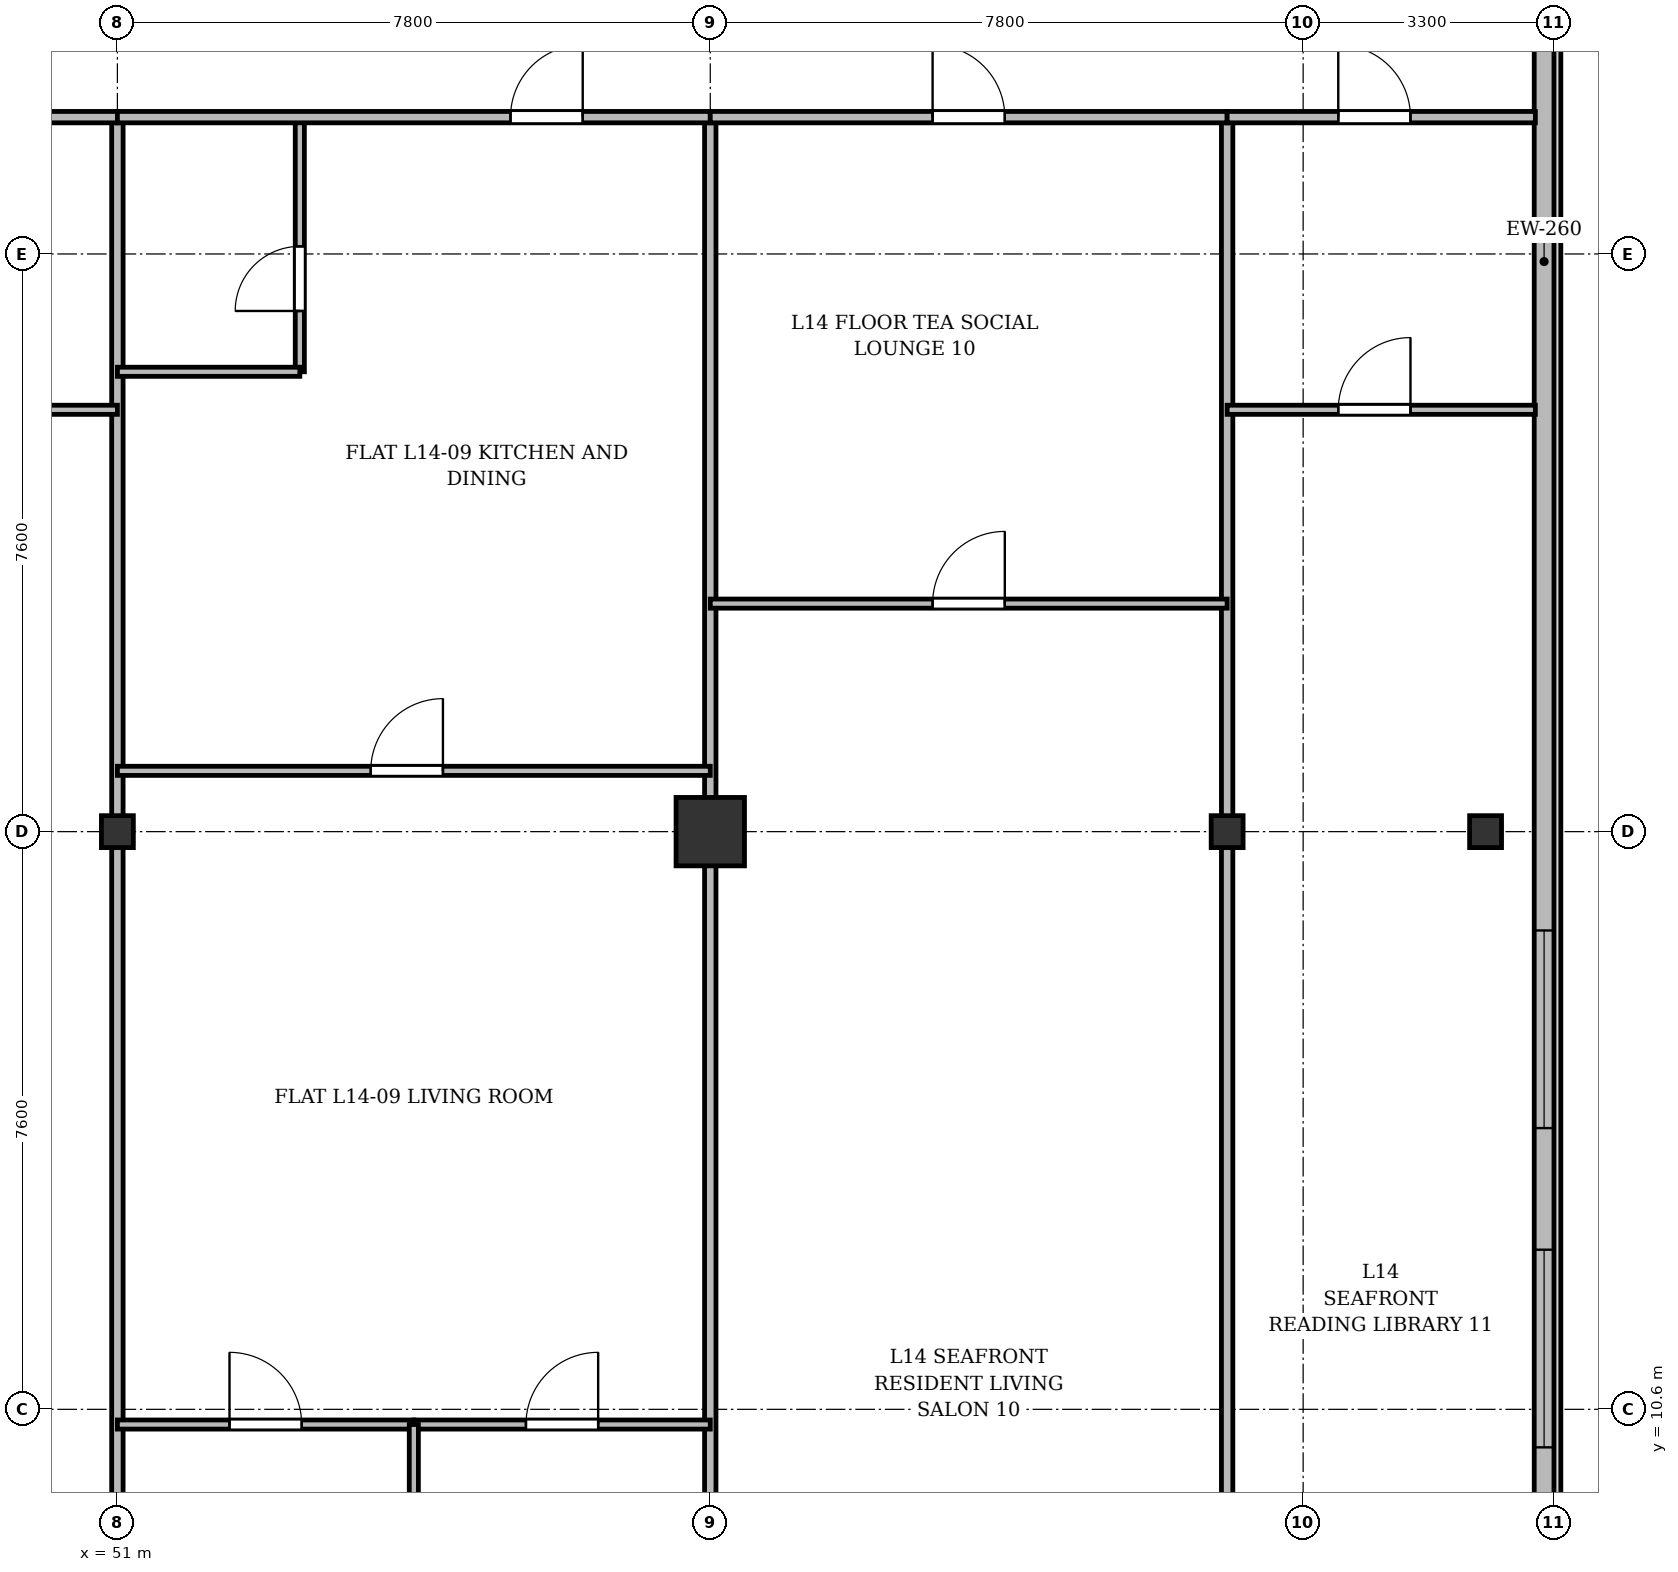
"""IFC4 building model, lengths in metres.
Left out: names, types, materials, properties, quantities, classifications, styles, units other than length and angle.
Written with IfcOpenShell. Run it as: python <this file> out.ifc"""

import sys

from ifc_helpers import new_model, si_unit, direction, frame, frame_2d, origin, origin_2d, place, context, subcontext, project, spatial, rectangle, i_section, extrude, source, transform, mapped, element, fill, save


model = new_model("IFC4")
c1 = context("Model", 3, precision=1e-05, world=origin(), true_north=direction((0.0, 1.0)))
c2 = subcontext(c1, "Body", "Model", "MODEL_VIEW")
j1 = project(units=[si_unit("LENGTHUNIT", "METRE"), si_unit("PLANEANGLEUNIT", "RADIAN")], contexts=[c1])
p1 = place(None, origin())
s1 = spatial("IfcSite", under=j1, at=p1, CompositionType="ELEMENT")
p2 = place(p1, origin())
s2 = spatial("IfcBuilding", under=s1, at=p2, CompositionType="ELEMENT")
p3 = place(p2, frame((0.0, 0.0, 55.9)))
s3 = spatial("IfcBuildingStorey", under=s2, at=p3, CompositionType="ELEMENT", Elevation=55.9)
m1 = source(origin(), c2, "Body", "SweptSolid", [
    extrude(i_section(OverallWidth=0.42, OverallDepth=0.42, WebThickness=0.026, FlangeThickness=0.04, at=origin_2d()), origin(), (0.0, 0.0, 1.0), 3.6),
])
p4 = place(p3, frame((51.0, 18.2, 0.0), z_axis=(0.0, 0.0, 1.0), x_axis=(1.0, 0.0, 0.0)))
e1 = element("IfcColumn", 1, at=p4, inside=s3, PredefinedType="COLUMN", context=c2, shape_type="MappedRepresentation", body=[
    mapped(m1, transform((0.0, 0.0, 0.0), x_axis=(1.0, 0.0, 0.0), y_axis=(0.0, 1.0, 0.0), z_axis=(0.0, 0.0, 1.0), scale=1.0)),
])
m2 = source(origin(), c2, "Body", "SweptSolid", [
    extrude(rectangle(XDim=0.9, YDim=0.9, at=origin_2d()), origin(), (0.0, 0.0, 1.0), 3.6),
])
p5 = place(p3, frame((58.8, 18.2, 0.0), z_axis=(0.0, 0.0, 1.0), x_axis=(1.0, 0.0, 0.0)))
e2 = element("IfcColumn", 2, at=p5, inside=s3, PredefinedType="COLUMN", context=c2, shape_type="MappedRepresentation", body=[
    mapped(m2, transform((0.0, 0.0, 0.0), x_axis=(1.0, 0.0, 0.0), y_axis=(0.0, 1.0, 0.0), z_axis=(0.0, 0.0, 1.0), scale=1.0)),
])
for number, where, z_axis, x_axis in (
    (3, (65.6, 18.2, 0.0), (0.0, 0.0, 1.0), (1.0, 0.0, 0.0)),
    (4, (69.0, 18.2, 0.0), (0.0, 0.0, 1.0), (1.0, 0.0, 0.0)),
):
    element("IfcColumn", number, at=place(p3, frame(where, z_axis=z_axis, x_axis=x_axis)), inside=s3, PredefinedType="COLUMN", context=c2, shape_type="MappedRepresentation", body=[
        mapped(m1, transform((0.0, 0.0, 0.0), x_axis=(1.0, 0.0, 0.0), y_axis=(0.0, 1.0, 0.0), z_axis=(0.0, 0.0, 1.0), scale=1.0)),
    ])
p6 = place(p3, frame((69.77, 45.5, 0.0), z_axis=(0.0, 0.0, 1.0), x_axis=(0.0, -1.0, 0.0)))
e5 = element("IfcWall", 5, at=p6, inside=s3, PredefinedType="SOLIDWALL", context=c2, shape_type="SweptSolid", body=[
    extrude(rectangle(XDim=39.6, YDim=0.26, at=frame_2d((19.8, 0.0))), origin(), (0.0, 0.0, 1.0), 3.34),
])
p7 = place(p6, frame((36.95, 0.0, 0.92)))
e6 = element("IfcOpeningElement", 6, at=p7, cuts=e5, PredefinedType="OPENING", context=c2, shape_type="SweptSolid", body=[
    extrude(rectangle(XDim=1.2, YDim=1.65, at=frame_2d((0.6, 0.825))), frame((0.0, 0.14, 0.0), z_axis=(0.0, -1.0, 0.0), x_axis=(1.0, 0.0, 0.0)), (0.0, 0.0, 1.0), 0.28),
])
p8 = place(p6, frame((32.8, 0.0, 0.92)))
e7 = element("IfcOpeningElement", 7, at=p8, cuts=e5, PredefinedType="OPENING", context=c2, shape_type="SweptSolid", body=[
    extrude(rectangle(XDim=2.6, YDim=1.9, at=frame_2d((1.3, 0.95))), frame((0.0, 0.14, 0.0), z_axis=(0.0, -1.0, 0.0), x_axis=(1.0, 0.0, 0.0)), (0.0, 0.0, 1.0), 0.28),
])
p9 = place(p6, frame((28.6, 0.0, 0.92)))
e8 = element("IfcOpeningElement", 8, at=p9, cuts=e5, PredefinedType="OPENING", context=c2, shape_type="SweptSolid", body=[
    extrude(rectangle(XDim=2.6, YDim=1.9, at=frame_2d((1.3, 0.95))), frame((0.0, 0.14, 0.0), z_axis=(0.0, -1.0, 0.0), x_axis=(1.0, 0.0, 0.0)), (0.0, 0.0, 1.0), 0.28),
])
p10 = place(p6, frame((7.4, 0.0, 0.92)))
e9 = element("IfcOpeningElement", 9, at=p10, cuts=e5, PredefinedType="OPENING", context=c2, shape_type="SweptSolid", body=[
    extrude(rectangle(XDim=2.6, YDim=1.9, at=frame_2d((1.3, 0.95))), frame((0.0, 0.14, 0.0), z_axis=(0.0, -1.0, 0.0), x_axis=(1.0, 0.0, 0.0)), (0.0, 0.0, 1.0), 0.28),
])
p11 = place(p6, frame((4.5, 0.0, 0.92)))
e10 = element("IfcOpeningElement", 10, at=p11, cuts=e5, PredefinedType="OPENING", context=c2, shape_type="SweptSolid", body=[
    extrude(rectangle(XDim=1.2, YDim=1.65, at=frame_2d((0.6, 0.825))), frame((0.0, 0.14, 0.0), z_axis=(0.0, -1.0, 0.0), x_axis=(1.0, 0.0, 0.0)), (0.0, 0.0, 1.0), 0.28),
])
p12 = place(p6, frame((1.15, 0.0, 0.92)))
e11 = element("IfcOpeningElement", 11, at=p12, cuts=e5, PredefinedType="OPENING", context=c2, shape_type="SweptSolid", body=[
    extrude(rectangle(XDim=1.2, YDim=1.65, at=frame_2d((0.6, 0.825))), frame((0.0, 0.14, 0.0), z_axis=(0.0, -1.0, 0.0), x_axis=(1.0, 0.0, 0.0)), (0.0, 0.0, 1.0), 0.28),
])
for number, where, z_axis, x_axis in (
    (12, (51.0, 3.145, 0.0), (0.0, 0.0, 1.0), (0.0, 1.0, 0.0)),
    (13, (58.8, 3.145, 0.0), (0.0, 0.0, 1.0), (0.0, 1.0, 0.0)),
    (14, (65.6, 3.145, 0.0), (0.0, 0.0, 1.0), (0.0, 1.0, 0.0)),
):
    element("IfcWall", number, at=place(p3, frame(where, z_axis=z_axis, x_axis=x_axis)), inside=s3, PredefinedType="PARTITIONING", context=c2, shape_type="SweptSolid", body=[
        extrude(rectangle(XDim=24.455, YDim=0.15, at=frame_2d((12.228, 0.0))), origin(), (0.0, 0.0, 1.0), 2.752),
    ])
p13 = place(p3, frame((43.8, 27.6, 0.0), z_axis=(0.0, 0.0, 1.0), x_axis=(1.0, 0.0, 0.0)))
e15 = element("IfcWall", 15, at=p13, inside=s3, PredefinedType="PARTITIONING", context=c2, shape_type="SweptSolid", body=[
    extrude(rectangle(XDim=7.2, YDim=0.15, at=frame_2d((3.6, 0.0))), origin(), (0.0, 0.0, 1.0), 2.752),
])
p14 = place(p13, frame((3.125, 0.0, 0.0)))
e16 = element("IfcOpeningElement", 16, at=p14, cuts=e15, PredefinedType="OPENING", context=c2, shape_type="SweptSolid", body=[
    extrude(rectangle(XDim=0.95, YDim=2.15, at=frame_2d((0.475, 1.075))), frame((0.0, 0.085, 0.0), z_axis=(0.0, -1.0, 0.0), x_axis=(1.0, 0.0, 0.0)), (0.0, 0.0, 1.0), 0.17),
])
p15 = place(p3, frame((43.8, 23.75, 0.0), z_axis=(0.0, 0.0, 1.0), x_axis=(1.0, 0.0, 0.0)))
e17 = element("IfcWall", 17, at=p15, inside=s3, PredefinedType="PARTITIONING", context=c2, shape_type="SweptSolid", body=[
    extrude(rectangle(XDim=7.2, YDim=0.12, at=frame_2d((3.6, 0.0))), origin(), (0.0, 0.0, 1.0), 2.752),
])
p16 = place(p15, frame((3.125, 0.0, 0.0)))
e18 = element("IfcOpeningElement", 18, at=p16, cuts=e17, PredefinedType="OPENING", context=c2, shape_type="SweptSolid", body=[
    extrude(rectangle(XDim=0.95, YDim=2.15, at=frame_2d((0.475, 1.075))), frame((0.0, 0.07, 0.0), z_axis=(0.0, -1.0, 0.0), x_axis=(1.0, 0.0, 0.0)), (0.0, 0.0, 1.0), 0.14),
])
p17 = place(p3, frame((51.0, 19.0, 0.0), z_axis=(0.0, 0.0, 1.0), x_axis=(1.0, 0.0, 0.0)))
e19 = element("IfcWall", 19, at=p17, inside=s3, PredefinedType="PARTITIONING", context=c2, shape_type="SweptSolid", body=[
    extrude(rectangle(XDim=7.8, YDim=0.12, at=frame_2d((3.9, 0.0))), origin(), (0.0, 0.0, 1.0), 2.752),
])
p18 = place(p17, frame((3.333, 0.0, 0.0)))
e20 = element("IfcOpeningElement", 20, at=p18, cuts=e19, PredefinedType="OPENING", context=c2, shape_type="SweptSolid", body=[
    extrude(rectangle(XDim=0.95, YDim=2.15, at=frame_2d((0.475, 1.075))), frame((0.0, 0.07, 0.0), z_axis=(0.0, -1.0, 0.0), x_axis=(1.0, 0.0, 0.0)), (0.0, 0.0, 1.0), 0.14),
])
p19 = place(p3, frame((53.4, 24.25, 0.0), z_axis=(0.0, 0.0, 1.0), x_axis=(0.0, 1.0, 0.0)))
e21 = element("IfcWall", 21, at=p19, inside=s3, PredefinedType="PARTITIONING", context=c2, shape_type="SweptSolid", body=[
    extrude(rectangle(XDim=3.35, YDim=0.12, at=frame_2d((1.675, 0.0))), origin(), (0.0, 0.0, 1.0), 2.94),
])
p20 = place(p19, frame((0.8, 0.0, 0.0)))
e22 = element("IfcOpeningElement", 22, at=p20, cuts=e21, PredefinedType="OPENING", context=c2, shape_type="SweptSolid", body=[
    extrude(rectangle(XDim=0.85, YDim=2.1, at=frame_2d((0.425, 1.05))), frame((0.0, 0.07, 0.0), z_axis=(0.0, -1.0, 0.0), x_axis=(1.0, 0.0, 0.0)), (0.0, 0.0, 1.0), 0.14),
])
p21 = place(p3, frame((51.0, 24.25, 0.0), z_axis=(0.0, 0.0, 1.0), x_axis=(1.0, 0.0, 0.0)))
e23 = element("IfcWall", 23, at=p21, inside=s3, PredefinedType="PARTITIONING", context=c2, shape_type="SweptSolid", body=[
    extrude(rectangle(XDim=2.4, YDim=0.12, at=frame_2d((1.2, 0.0))), origin(), (0.0, 0.0, 1.0), 2.752),
])
p22 = place(p3, frame((51.0, 27.6, 0.0), z_axis=(0.0, 0.0, 1.0), x_axis=(1.0, 0.0, 0.0)))
e24 = element("IfcWall", 24, at=p22, inside=s3, PredefinedType="PARTITIONING", context=c2, shape_type="SweptSolid", body=[
    extrude(rectangle(XDim=7.8, YDim=0.15, at=frame_2d((3.9, 0.0))), origin(), (0.0, 0.0, 1.0), 2.752),
])
p23 = place(p22, frame((5.172, 0.0, 0.0)))
e25 = element("IfcOpeningElement", 25, at=p23, cuts=e24, PredefinedType="OPENING", context=c2, shape_type="SweptSolid", body=[
    extrude(rectangle(XDim=0.95, YDim=2.15, at=frame_2d((0.475, 1.075))), frame((0.0, 0.085, 0.0), z_axis=(0.0, -1.0, 0.0), x_axis=(1.0, 0.0, 0.0)), (0.0, 0.0, 1.0), 0.17),
])
p24 = place(p3, frame((51.0, 10.4, 0.0), z_axis=(0.0, 0.0, 1.0), x_axis=(1.0, 0.0, 0.0)))
e26 = element("IfcWall", 26, at=p24, inside=s3, PredefinedType="PARTITIONING", context=c2, shape_type="SweptSolid", body=[
    extrude(rectangle(XDim=3.9, YDim=0.12, at=frame_2d((1.95, 0.0))), origin(), (0.0, 0.0, 1.0), 2.752),
])
p25 = place(p24, frame((1.475, 0.0, 0.0)))
e27 = element("IfcOpeningElement", 27, at=p25, cuts=e26, PredefinedType="OPENING", context=c2, shape_type="SweptSolid", body=[
    extrude(rectangle(XDim=0.95, YDim=2.15, at=frame_2d((0.475, 1.075))), frame((0.0, 0.07, 0.0), z_axis=(0.0, -1.0, 0.0), x_axis=(1.0, 0.0, 0.0)), (0.0, 0.0, 1.0), 0.14),
])
p26 = place(p3, frame((54.9, 10.4, 0.0), z_axis=(0.0, 0.0, 1.0), x_axis=(1.0, 0.0, 0.0)))
e28 = element("IfcWall", 28, at=p26, inside=s3, PredefinedType="PARTITIONING", context=c2, shape_type="SweptSolid", body=[
    extrude(rectangle(XDim=3.9, YDim=0.12, at=frame_2d((1.95, 0.0))), origin(), (0.0, 0.0, 1.0), 2.752),
])
p27 = place(p26, frame((1.475, 0.0, 0.0)))
e29 = element("IfcOpeningElement", 29, at=p27, cuts=e28, PredefinedType="OPENING", context=c2, shape_type="SweptSolid", body=[
    extrude(rectangle(XDim=0.95, YDim=2.15, at=frame_2d((0.475, 1.075))), frame((0.0, 0.07, 0.0), z_axis=(0.0, -1.0, 0.0), x_axis=(1.0, 0.0, 0.0)), (0.0, 0.0, 1.0), 0.14),
])
p28 = place(p3, frame((54.9, 3.145, 0.0), z_axis=(0.0, 0.0, 1.0), x_axis=(0.0, 1.0, 0.0)))
e30 = element("IfcWall", 30, at=p28, inside=s3, PredefinedType="PARTITIONING", context=c2, shape_type="SweptSolid", body=[
    extrude(rectangle(XDim=7.255, YDim=0.12, at=frame_2d((3.627, 0.0))), origin(), (0.0, 0.0, 1.0), 2.69),
])
p29 = place(p3, frame((58.8, 27.6, 0.0), z_axis=(0.0, 0.0, 1.0), x_axis=(1.0, 0.0, 0.0)))
e31 = element("IfcWall", 31, at=p29, inside=s3, PredefinedType="PARTITIONING", context=c2, shape_type="SweptSolid", body=[
    extrude(rectangle(XDim=6.8, YDim=0.15, at=frame_2d((3.4, 0.0))), origin(), (0.0, 0.0, 1.0), 2.752),
])
p30 = place(p29, frame((2.925, 0.0, 0.0)))
e32 = element("IfcOpeningElement", 32, at=p30, cuts=e31, PredefinedType="OPENING", context=c2, shape_type="SweptSolid", body=[
    extrude(rectangle(XDim=0.95, YDim=2.15, at=frame_2d((0.475, 1.075))), frame((0.0, 0.085, 0.0), z_axis=(0.0, -1.0, 0.0), x_axis=(1.0, 0.0, 0.0)), (0.0, 0.0, 1.0), 0.17),
])
p31 = place(p3, frame((58.8, 21.2, 0.0), z_axis=(0.0, 0.0, 1.0), x_axis=(1.0, 0.0, 0.0)))
e33 = element("IfcWall", 33, at=p31, inside=s3, PredefinedType="PARTITIONING", context=c2, shape_type="SweptSolid", body=[
    extrude(rectangle(XDim=6.8, YDim=0.12, at=frame_2d((3.4, 0.0))), origin(), (0.0, 0.0, 1.0), 2.752),
])
p32 = place(p31, frame((2.925, 0.0, 0.0)))
e34 = element("IfcOpeningElement", 34, at=p32, cuts=e33, PredefinedType="OPENING", context=c2, shape_type="SweptSolid", body=[
    extrude(rectangle(XDim=0.95, YDim=2.15, at=frame_2d((0.475, 1.075))), frame((0.0, 0.07, 0.0), z_axis=(0.0, -1.0, 0.0), x_axis=(1.0, 0.0, 0.0)), (0.0, 0.0, 1.0), 0.14),
])
p33 = place(p3, frame((65.6, 27.6, 0.0), z_axis=(0.0, 0.0, 1.0), x_axis=(1.0, 0.0, 0.0)))
e35 = element("IfcWall", 35, at=p33, inside=s3, PredefinedType="PARTITIONING", context=c2, shape_type="SweptSolid", body=[
    extrude(rectangle(XDim=4.055, YDim=0.15, at=frame_2d((2.027, 0.0))), origin(), (0.0, 0.0, 1.0), 2.752),
])
p34 = place(p33, frame((1.462, 0.0, 0.0)))
e36 = element("IfcOpeningElement", 36, at=p34, cuts=e35, PredefinedType="OPENING", context=c2, shape_type="SweptSolid", body=[
    extrude(rectangle(XDim=0.95, YDim=2.15, at=frame_2d((0.475, 1.075))), frame((0.0, 0.085, 0.0), z_axis=(0.0, -1.0, 0.0), x_axis=(1.0, 0.0, 0.0)), (0.0, 0.0, 1.0), 0.17),
])
p35 = place(p3, frame((65.6, 23.75, 0.0), z_axis=(0.0, 0.0, 1.0), x_axis=(1.0, 0.0, 0.0)))
e37 = element("IfcWall", 37, at=p35, inside=s3, PredefinedType="PARTITIONING", context=c2, shape_type="SweptSolid", body=[
    extrude(rectangle(XDim=4.055, YDim=0.12, at=frame_2d((2.027, 0.0))), origin(), (0.0, 0.0, 1.0), 2.752),
])
p36 = place(p35, frame((1.462, 0.0, 0.0)))
e38 = element("IfcOpeningElement", 38, at=p36, cuts=e37, PredefinedType="OPENING", context=c2, shape_type="SweptSolid", body=[
    extrude(rectangle(XDim=0.95, YDim=2.15, at=frame_2d((0.475, 1.075))), frame((0.0, 0.07, 0.0), z_axis=(0.0, -1.0, 0.0), x_axis=(1.0, 0.0, 0.0)), (0.0, 0.0, 1.0), 0.14),
])
m3 = source(origin(), c2, "Body", "SweptSolid", [
    extrude(rectangle(XDim=2.6, YDim=1.9, at=frame_2d((1.3, 0.95))), frame((0.0, 0.03, 0.0), z_axis=(0.0, -1.0, 0.0), x_axis=(1.0, 0.0, 0.0)), (0.0, 0.0, 1.0), 0.06),
])
p37 = place(p8, origin())
e39 = element("IfcWindow", 39, at=p37, inside=s3, PartitioningType="SINGLE_PANEL", PredefinedType="WINDOW", context=c2, shape_type="MappedRepresentation", body=[
    mapped(m3, transform((0.0, 0.0, 0.0), x_axis=(1.0, 0.0, 0.0), y_axis=(0.0, 1.0, 0.0), z_axis=(0.0, 0.0, 1.0), scale=1.0)),
])
fill(e7, e39)
p38 = place(p9, origin())
e40 = element("IfcWindow", 40, at=p38, inside=s3, PartitioningType="SINGLE_PANEL", PredefinedType="WINDOW", context=c2, shape_type="MappedRepresentation", body=[
    mapped(m3, transform((0.0, 0.0, 0.0), x_axis=(1.0, 0.0, 0.0), y_axis=(0.0, 1.0, 0.0), z_axis=(0.0, 0.0, 1.0), scale=1.0)),
])
fill(e8, e40)
m4 = source(origin(), c2, "Body", "SweptSolid", [
    extrude(rectangle(XDim=0.95, YDim=2.15, at=frame_2d((0.475, 1.075))), frame((0.0, 0.025, 0.0), z_axis=(0.0, -1.0, 0.0), x_axis=(1.0, 0.0, 0.0)), (0.0, 0.0, 1.0), 0.05),
])
p39 = place(p18, origin())
e41 = element("IfcDoor", 41, at=p39, inside=s3, OperationType="SINGLE_SWING_RIGHT", PredefinedType="DOOR", context=c2, shape_type="MappedRepresentation", body=[
    mapped(m4, transform((0.0, 0.0, 0.0), x_axis=(1.0, 0.0, 0.0), y_axis=(0.0, 1.0, 0.0), z_axis=(0.0, 0.0, 1.0), scale=1.0)),
])
fill(e20, e41)
m5 = source(origin(), c2, "Body", "SweptSolid", [
    extrude(rectangle(XDim=0.85, YDim=2.1, at=frame_2d((0.425, 1.05))), frame((0.0, 0.025, 0.0), z_axis=(0.0, -1.0, 0.0), x_axis=(1.0, 0.0, 0.0)), (0.0, 0.0, 1.0), 0.05),
])
p40 = place(p20, origin())
e42 = element("IfcDoor", 42, at=p40, inside=s3, OperationType="SINGLE_SWING_LEFT", PredefinedType="DOOR", context=c2, shape_type="MappedRepresentation", body=[
    mapped(m5, transform((0.0, 0.0, 0.0), x_axis=(1.0, 0.0, 0.0), y_axis=(0.0, 1.0, 0.0), z_axis=(0.0, 0.0, 1.0), scale=1.0)),
])
fill(e22, e42)
p41 = place(p23, origin())
e43 = element("IfcDoor", 43, at=p41, inside=s3, OperationType="SINGLE_SWING_RIGHT", PredefinedType="DOOR", context=c2, shape_type="MappedRepresentation", body=[
    mapped(m4, transform((0.0, 0.0, 0.0), x_axis=(1.0, 0.0, 0.0), y_axis=(0.0, 1.0, 0.0), z_axis=(0.0, 0.0, 1.0), scale=1.0)),
])
fill(e25, e43)
p42 = place(p25, origin())
e44 = element("IfcDoor", 44, at=p42, inside=s3, OperationType="SINGLE_SWING_LEFT", PredefinedType="DOOR", context=c2, shape_type="MappedRepresentation", body=[
    mapped(m4, transform((0.0, 0.0, 0.0), x_axis=(1.0, 0.0, 0.0), y_axis=(0.0, 1.0, 0.0), z_axis=(0.0, 0.0, 1.0), scale=1.0)),
])
fill(e27, e44)
p43 = place(p27, origin())
e45 = element("IfcDoor", 45, at=p43, inside=s3, OperationType="SINGLE_SWING_RIGHT", PredefinedType="DOOR", context=c2, shape_type="MappedRepresentation", body=[
    mapped(m4, transform((0.0, 0.0, 0.0), x_axis=(1.0, 0.0, 0.0), y_axis=(0.0, 1.0, 0.0), z_axis=(0.0, 0.0, 1.0), scale=1.0)),
])
fill(e29, e45)
p44 = place(p30, origin())
e46 = element("IfcDoor", 46, at=p44, inside=s3, OperationType="SINGLE_SWING_LEFT", PredefinedType="DOOR", context=c2, shape_type="MappedRepresentation", body=[
    mapped(m4, transform((0.0, 0.0, 0.0), x_axis=(1.0, 0.0, 0.0), y_axis=(0.0, 1.0, 0.0), z_axis=(0.0, 0.0, 1.0), scale=1.0)),
])
fill(e32, e46)
p45 = place(p32, origin())
e47 = element("IfcDoor", 47, at=p45, inside=s3, OperationType="SINGLE_SWING_RIGHT", PredefinedType="DOOR", context=c2, shape_type="MappedRepresentation", body=[
    mapped(m4, transform((0.0, 0.0, 0.0), x_axis=(1.0, 0.0, 0.0), y_axis=(0.0, 1.0, 0.0), z_axis=(0.0, 0.0, 1.0), scale=1.0)),
])
fill(e34, e47)
p46 = place(p34, origin())
e48 = element("IfcDoor", 48, at=p46, inside=s3, OperationType="SINGLE_SWING_LEFT", PredefinedType="DOOR", context=c2, shape_type="MappedRepresentation", body=[
    mapped(m4, transform((0.0, 0.0, 0.0), x_axis=(1.0, 0.0, 0.0), y_axis=(0.0, 1.0, 0.0), z_axis=(0.0, 0.0, 1.0), scale=1.0)),
])
fill(e36, e48)
p47 = place(p36, origin())
e49 = element("IfcDoor", 49, at=p47, inside=s3, OperationType="SINGLE_SWING_RIGHT", PredefinedType="DOOR", context=c2, shape_type="MappedRepresentation", body=[
    mapped(m4, transform((0.0, 0.0, 0.0), x_axis=(1.0, 0.0, 0.0), y_axis=(0.0, 1.0, 0.0), z_axis=(0.0, 0.0, 1.0), scale=1.0)),
])
fill(e38, e49)
save(model, sys.argv[1])
